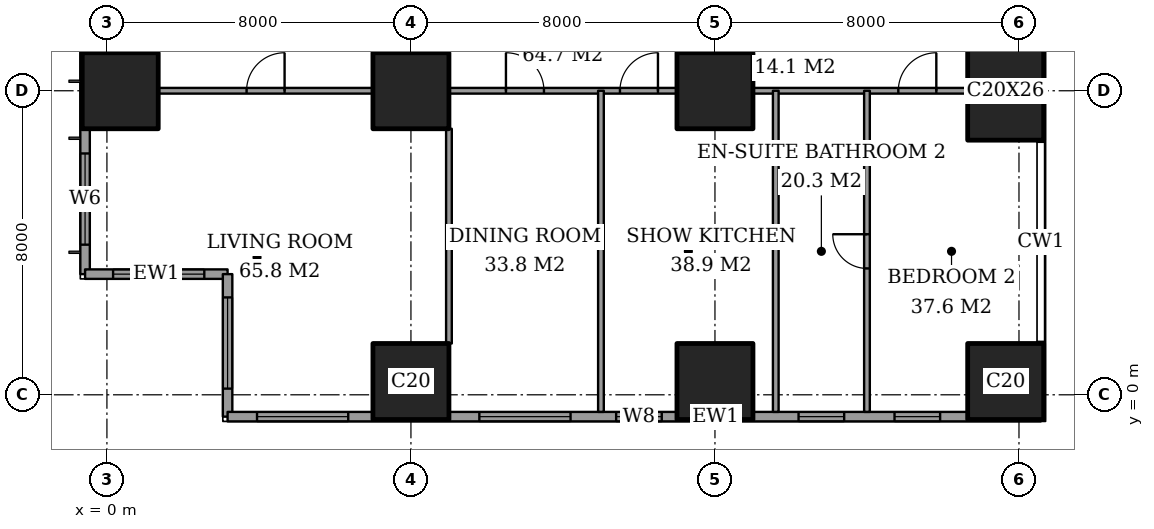
"""IFC4 building model, lengths in metres.
Left out: names, types, materials, properties, quantities, classifications, styles, units other than length and angle.
Written with IfcOpenShell. Run it as: python <this file> out.ifc"""

import sys

from ifc_helpers import new_model, si_unit, direction, frame, frame_2d, origin, origin_2d, place, context, subcontext, project, spatial, rectangle, extrude, element, fill, save


model = new_model("IFC4")
c1 = context("Model", 3, precision=1e-05, world=origin(), true_north=direction((0.0, 1.0)))
c2 = subcontext(c1, "Body", "Model", "MODEL_VIEW")
j1 = project(units=[si_unit("LENGTHUNIT", "METRE"), si_unit("PLANEANGLEUNIT", "RADIAN")], contexts=[c1])
p1 = place(None, origin())
s1 = spatial("IfcSite", under=j1, at=p1, CompositionType="ELEMENT")
p2 = place(p1, origin())
s2 = spatial("IfcBuilding", under=s1, at=p2, CompositionType="ELEMENT")
p3 = place(p2, frame((0.0, 0.0, 51.2)))
s3 = spatial("IfcBuildingStorey", under=s2, at=p3, CompositionType="ELEMENT", Elevation=51.2)
for number, where, z_axis, x_axis in (
    (1, (0.35, 8.0, 0.0), (0.0, 0.0, 1.0), (1.0, 0.0, 0.0)),
    (2, (8.0, 0.35, 0.0), (0.0, 0.0, 1.0), (1.0, 0.0, 0.0)),
    (3, (8.0, 8.0, 0.0), (0.0, 0.0, 1.0), (1.0, 0.0, 0.0)),
    (4, (16.0, 0.35, 0.0), (0.0, 0.0, 1.0), (1.0, 0.0, 0.0)),
    (5, (16.0, 8.0, 0.0), (0.0, 0.0, 1.0), (1.0, 0.0, 0.0)),
    (6, (23.65, 0.35, 0.0), (0.0, 0.0, 1.0), (1.0, 0.0, 0.0)),
):
    element("IfcColumn", number, at=place(p3, frame(where, z_axis=z_axis, x_axis=x_axis)), inside=s3, PredefinedType="COLUMN", context=c2, shape_type="SweptSolid", body=[
        extrude(rectangle(XDim=2.0, YDim=2.0, at=origin_2d()), origin(), (0.0, 0.0, 1.0), 3.6),
    ])
p4 = place(p3, frame((23.65, 8.0, 0.0), z_axis=(0.0, 0.0, 1.0), x_axis=(1.0, 0.0, 0.0)))
e7 = element("IfcColumn", 7, at=p4, inside=s3, PredefinedType="COLUMN", context=c2, shape_type="SweptSolid", body=[
    extrude(rectangle(XDim=2.0, YDim=2.6, at=origin_2d()), origin(), (0.0, 0.0, 1.0), 3.6),
])
p5 = place(p3, frame((-0.575, 44.825, 0.0), z_axis=(0.0, 0.0, 1.0), x_axis=(0.0, -1.0, 0.0)))
e8 = element("IfcWall", 8, at=p5, inside=s3, PredefinedType="SOLIDWALL", context=c2, shape_type="SweptSolid", body=[
    extrude(rectangle(XDim=41.65, YDim=0.25, at=frame_2d((20.825, 0.0))), origin(), (0.0, 0.0, 1.0), 3.6),
])
p6 = place(p5, frame((0.775, 0.0, 0.6)))
e9 = element("IfcOpeningElement", 9, at=p6, cuts=e8, PredefinedType="OPENING", context=c2, shape_type="SweptSolid", body=[
    extrude(rectangle(XDim=2.4, YDim=2.0, at=frame_2d((1.2, 1.0))), frame((0.0, 0.135, 0.0), z_axis=(0.0, -1.0, 0.0), x_axis=(1.0, 0.0, 0.0)), (0.0, 0.0, 1.0), 0.27),
])
p7 = place(p5, frame((6.1, 0.0, 0.6)))
e10 = element("IfcOpeningElement", 10, at=p7, cuts=e8, PredefinedType="OPENING", context=c2, shape_type="SweptSolid", body=[
    extrude(rectangle(XDim=1.2, YDim=2.0, at=frame_2d((0.6, 1.0))), frame((0.0, 0.135, 0.0), z_axis=(0.0, -1.0, 0.0), x_axis=(1.0, 0.0, 0.0)), (0.0, 0.0, 1.0), 0.27),
])
p8 = place(p5, frame((8.425, 0.0, 0.6)))
e11 = element("IfcOpeningElement", 11, at=p8, cuts=e8, PredefinedType="OPENING", context=c2, shape_type="SweptSolid", body=[
    extrude(rectangle(XDim=2.4, YDim=2.0, at=frame_2d((1.2, 1.0))), frame((0.0, 0.135, 0.0), z_axis=(0.0, -1.0, 0.0), x_axis=(1.0, 0.0, 0.0)), (0.0, 0.0, 1.0), 0.27),
])
p9 = place(p5, frame((15.625, 0.0, 0.6)))
e12 = element("IfcOpeningElement", 12, at=p9, cuts=e8, PredefinedType="OPENING", context=c2, shape_type="SweptSolid", body=[
    extrude(rectangle(XDim=2.4, YDim=2.0, at=frame_2d((1.2, 1.0))), frame((0.0, 0.135, 0.0), z_axis=(0.0, -1.0, 0.0), x_axis=(1.0, 0.0, 0.0)), (0.0, 0.0, 1.0), 0.27),
])
p10 = place(p5, frame((23.625, 0.0, 0.6)))
e13 = element("IfcOpeningElement", 13, at=p10, cuts=e8, PredefinedType="OPENING", context=c2, shape_type="SweptSolid", body=[
    extrude(rectangle(XDim=2.4, YDim=2.0, at=frame_2d((1.2, 1.0))), frame((0.0, 0.135, 0.0), z_axis=(0.0, -1.0, 0.0), x_axis=(1.0, 0.0, 0.0)), (0.0, 0.0, 1.0), 0.27),
])
p11 = place(p5, frame((30.825, 0.0, 0.6)))
e14 = element("IfcOpeningElement", 14, at=p11, cuts=e8, PredefinedType="OPENING", context=c2, shape_type="SweptSolid", body=[
    extrude(rectangle(XDim=2.4, YDim=2.0, at=frame_2d((1.2, 1.0))), frame((0.0, 0.135, 0.0), z_axis=(0.0, -1.0, 0.0), x_axis=(1.0, 0.0, 0.0)), (0.0, 0.0, 1.0), 0.27),
])
p12 = place(p5, frame((34.5, 0.0, 0.6)))
e15 = element("IfcOpeningElement", 15, at=p12, cuts=e8, PredefinedType="OPENING", context=c2, shape_type="SweptSolid", body=[
    extrude(rectangle(XDim=1.2, YDim=2.0, at=frame_2d((0.6, 1.0))), frame((0.0, 0.135, 0.0), z_axis=(0.0, -1.0, 0.0), x_axis=(1.0, 0.0, 0.0)), (0.0, 0.0, 1.0), 0.27),
])
p13 = place(p5, frame((38.475, 0.0, 0.6)))
e16 = element("IfcOpeningElement", 16, at=p13, cuts=e8, PredefinedType="OPENING", context=c2, shape_type="SweptSolid", body=[
    extrude(rectangle(XDim=2.4, YDim=2.0, at=frame_2d((1.2, 1.0))), frame((0.0, 0.135, 0.0), z_axis=(0.0, -1.0, 0.0), x_axis=(1.0, 0.0, 0.0)), (0.0, 0.0, 1.0), 0.27),
])
p14 = place(p3, frame((-0.575, 3.175, 0.0), z_axis=(0.0, 0.0, 1.0), x_axis=(1.0, 0.0, 0.0)))
e17 = element("IfcWall", 17, at=p14, inside=s3, PredefinedType="SOLIDWALL", context=c2, shape_type="SweptSolid", body=[
    extrude(rectangle(XDim=3.75, YDim=0.25, at=frame_2d((1.875, 0.0))), origin(), (0.0, 0.0, 1.0), 3.6),
])
p15 = place(p14, frame((0.738, 0.0, 0.6)))
e18 = element("IfcOpeningElement", 18, at=p15, cuts=e17, PredefinedType="OPENING", context=c2, shape_type="SweptSolid", body=[
    extrude(rectangle(XDim=2.4, YDim=2.0, at=frame_2d((1.2, 1.0))), frame((0.0, 0.135, 0.0), z_axis=(0.0, -1.0, 0.0), x_axis=(1.0, 0.0, 0.0)), (0.0, 0.0, 1.0), 0.27),
])
p16 = place(p3, frame((3.175, 3.175, 0.0), z_axis=(0.0, 0.0, 1.0), x_axis=(0.0, -1.0, 0.0)))
e19 = element("IfcWall", 19, at=p16, inside=s3, PredefinedType="SOLIDWALL", context=c2, shape_type="SweptSolid", body=[
    extrude(rectangle(XDim=3.75, YDim=0.25, at=frame_2d((1.875, 0.0))), origin(), (0.0, 0.0, 1.0), 3.6),
])
p17 = place(p16, frame((0.613, 0.0, 0.6)))
e20 = element("IfcOpeningElement", 20, at=p17, cuts=e19, PredefinedType="OPENING", context=c2, shape_type="SweptSolid", body=[
    extrude(rectangle(XDim=2.4, YDim=2.0, at=frame_2d((1.2, 1.0))), frame((0.0, 0.135, 0.0), z_axis=(0.0, -1.0, 0.0), x_axis=(1.0, 0.0, 0.0)), (0.0, 0.0, 1.0), 0.27),
])
p18 = place(p3, frame((3.175, -0.575, 0.0), z_axis=(0.0, 0.0, 1.0), x_axis=(1.0, 0.0, 0.0)))
e21 = element("IfcWall", 21, at=p18, inside=s3, PredefinedType="SOLIDWALL", context=c2, shape_type="SweptSolid", body=[
    extrude(rectangle(XDim=21.4, YDim=0.25, at=frame_2d((10.7, 0.0))), origin(), (0.0, 0.0, 1.0), 3.6),
])
p19 = place(p18, frame((0.775, 0.0, 0.6)))
e22 = element("IfcOpeningElement", 22, at=p19, cuts=e21, PredefinedType="OPENING", context=c2, shape_type="SweptSolid", body=[
    extrude(rectangle(XDim=2.4, YDim=2.0, at=frame_2d((1.2, 1.0))), frame((0.0, 0.135, 0.0), z_axis=(0.0, -1.0, 0.0), x_axis=(1.0, 0.0, 0.0)), (0.0, 0.0, 1.0), 0.27),
])
p20 = place(p18, frame((6.625, 0.0, 0.6)))
e23 = element("IfcOpeningElement", 23, at=p20, cuts=e21, PredefinedType="OPENING", context=c2, shape_type="SweptSolid", body=[
    extrude(rectangle(XDim=2.4, YDim=2.0, at=frame_2d((1.2, 1.0))), frame((0.0, 0.135, 0.0), z_axis=(0.0, -1.0, 0.0), x_axis=(1.0, 0.0, 0.0)), (0.0, 0.0, 1.0), 0.27),
])
p21 = place(p18, frame((10.225, 0.0, 0.6)))
e24 = element("IfcOpeningElement", 24, at=p21, cuts=e21, PredefinedType="OPENING", context=c2, shape_type="SweptSolid", body=[
    extrude(rectangle(XDim=1.2, YDim=2.0, at=frame_2d((0.6, 1.0))), frame((0.0, 0.135, 0.0), z_axis=(0.0, -1.0, 0.0), x_axis=(1.0, 0.0, 0.0)), (0.0, 0.0, 1.0), 0.27),
])
p22 = place(p18, frame((15.025, 0.0, 0.6)))
e25 = element("IfcOpeningElement", 25, at=p22, cuts=e21, PredefinedType="OPENING", context=c2, shape_type="SweptSolid", body=[
    extrude(rectangle(XDim=1.2, YDim=2.0, at=frame_2d((0.6, 1.0))), frame((0.0, 0.135, 0.0), z_axis=(0.0, -1.0, 0.0), x_axis=(1.0, 0.0, 0.0)), (0.0, 0.0, 1.0), 0.27),
])
p23 = place(p18, frame((17.55, 0.0, 0.6)))
e26 = element("IfcOpeningElement", 26, at=p23, cuts=e21, PredefinedType="OPENING", context=c2, shape_type="SweptSolid", body=[
    extrude(rectangle(XDim=1.2, YDim=2.0, at=frame_2d((0.6, 1.0))), frame((0.0, 0.135, 0.0), z_axis=(0.0, -1.0, 0.0), x_axis=(1.0, 0.0, 0.0)), (0.0, 0.0, 1.0), 0.27),
])
p24 = place(p3, frame((1.35, 8.0, 0.0), z_axis=(0.0, 0.0, 1.0), x_axis=(1.0, 0.0, 0.0)))
e27 = element("IfcWall", 27, at=p24, inside=s3, PredefinedType="PARTITIONING", context=c2, shape_type="SweptSolid", body=[
    extrude(rectangle(XDim=5.65, YDim=0.15, at=frame_2d((2.825, 0.0))), origin(), (0.0, 0.0, 1.0), 3.35),
])
p25 = place(p24, frame((2.325, 0.0, 0.0)))
e28 = element("IfcOpeningElement", 28, at=p25, cuts=e27, PredefinedType="OPENING", context=c2, shape_type="SweptSolid", body=[
    extrude(rectangle(XDim=1.0, YDim=2.1, at=frame_2d((0.5, 1.05))), frame((0.0, 0.085, 0.0), z_axis=(0.0, -1.0, 0.0), x_axis=(1.0, 0.0, 0.0)), (0.0, 0.0, 1.0), 0.17),
])
p26 = place(p3, frame((9.0, 8.0, 0.0), z_axis=(0.0, 0.0, 1.0), x_axis=(1.0, 0.0, 0.0)))
e29 = element("IfcWall", 29, at=p26, inside=s3, PredefinedType="PARTITIONING", context=c2, shape_type="SweptSolid", body=[
    extrude(rectangle(XDim=6.0, YDim=0.15, at=frame_2d((3.0, 0.0))), origin(), (0.0, 0.0, 1.0), 3.35),
])
p27 = place(p26, frame((1.5, 0.0, 0.0)))
e30 = element("IfcOpeningElement", 30, at=p27, cuts=e29, PredefinedType="OPENING", context=c2, shape_type="SweptSolid", body=[
    extrude(rectangle(XDim=1.0, YDim=2.1, at=frame_2d((0.5, 1.05))), frame((0.0, 0.085, 0.0), z_axis=(0.0, -1.0, 0.0), x_axis=(1.0, 0.0, 0.0)), (0.0, 0.0, 1.0), 0.17),
])
p28 = place(p26, frame((4.5, 0.0, 0.0)))
e31 = element("IfcOpeningElement", 31, at=p28, cuts=e29, PredefinedType="OPENING", context=c2, shape_type="SweptSolid", body=[
    extrude(rectangle(XDim=1.0, YDim=2.1, at=frame_2d((0.5, 1.05))), frame((0.0, 0.085, 0.0), z_axis=(0.0, -1.0, 0.0), x_axis=(1.0, 0.0, 0.0)), (0.0, 0.0, 1.0), 0.17),
])
p29 = place(p3, frame((17.0, 8.0, 0.0), z_axis=(0.0, 0.0, 1.0), x_axis=(1.0, 0.0, 0.0)))
e32 = element("IfcWall", 32, at=p29, inside=s3, PredefinedType="PARTITIONING", context=c2, shape_type="SweptSolid", body=[
    extrude(rectangle(XDim=5.65, YDim=0.15, at=frame_2d((2.825, 0.0))), origin(), (0.0, 0.0, 1.0), 3.35),
])
p30 = place(p29, frame((3.825, 0.0, 0.0)))
e33 = element("IfcOpeningElement", 33, at=p30, cuts=e32, PredefinedType="OPENING", context=c2, shape_type="SweptSolid", body=[
    extrude(rectangle(XDim=1.0, YDim=2.1, at=frame_2d((0.5, 1.05))), frame((0.0, 0.085, 0.0), z_axis=(0.0, -1.0, 0.0), x_axis=(1.0, 0.0, 0.0)), (0.0, 0.0, 1.0), 0.17),
])
p31 = place(p3, frame((9.0, 1.35, 0.0), z_axis=(0.0, 0.0, 1.0), x_axis=(0.0, 1.0, 0.0)))
e34 = element("IfcWall", 34, at=p31, inside=s3, PredefinedType="PARTITIONING", context=c2, shape_type="SweptSolid", body=[
    extrude(rectangle(XDim=5.65, YDim=0.15, at=frame_2d((2.825, 0.0))), origin(), (0.0, 0.0, 1.0), 3.35),
])
for number, where, z_axis, x_axis in (
    (35, (13.0, -0.45, 0.0), (0.0, 0.0, 1.0), (0.0, 1.0, 0.0)),
    (36, (17.6, -0.45, 0.0), (0.0, 0.0, 1.0), (0.0, 1.0, 0.0)),
):
    element("IfcWall", number, at=place(p3, frame(where, z_axis=z_axis, x_axis=x_axis)), inside=s3, PredefinedType="PARTITIONING", context=c2, shape_type="SweptSolid", body=[
        extrude(rectangle(XDim=8.45, YDim=0.15, at=frame_2d((4.225, 0.0))), origin(), (0.0, 0.0, 1.0), 3.35),
    ])
p32 = place(p3, frame((20.0, -0.45, 0.0), z_axis=(0.0, 0.0, 1.0), x_axis=(0.0, 1.0, 0.0)))
e37 = element("IfcWall", 37, at=p32, inside=s3, PredefinedType="PARTITIONING", context=c2, shape_type="SweptSolid", body=[
    extrude(rectangle(XDim=8.45, YDim=0.15, at=frame_2d((4.225, 0.0))), origin(), (0.0, 0.0, 1.0), 3.35),
])
p33 = place(p32, frame((3.775, 0.0, 0.0)))
e38 = element("IfcOpeningElement", 38, at=p33, cuts=e37, PredefinedType="OPENING", context=c2, shape_type="SweptSolid", body=[
    extrude(rectangle(XDim=0.9, YDim=2.1, at=frame_2d((0.45, 1.05))), frame((0.0, 0.085, 0.0), z_axis=(0.0, -1.0, 0.0), x_axis=(1.0, 0.0, 0.0)), (0.0, 0.0, 1.0), 0.17),
])
p34 = place(p13, origin())
e39 = element("IfcWindow", 39, at=p34, inside=s3, PartitioningType="SINGLE_PANEL", PredefinedType="WINDOW", context=c2, shape_type="SweptSolid", body=[
    extrude(rectangle(XDim=2.4, YDim=2.0, at=frame_2d((1.2, 1.0))), frame((0.0, 0.03, 0.0), z_axis=(0.0, -1.0, 0.0), x_axis=(1.0, 0.0, 0.0)), (0.0, 0.0, 1.0), 0.06),
])
fill(e16, e39)
p35 = place(p15, origin())
e40 = element("IfcWindow", 40, at=p35, inside=s3, PartitioningType="SINGLE_PANEL", PredefinedType="WINDOW", context=c2, shape_type="SweptSolid", body=[
    extrude(rectangle(XDim=2.4, YDim=2.0, at=frame_2d((1.2, 1.0))), frame((0.0, 0.03, 0.0), z_axis=(0.0, -1.0, 0.0), x_axis=(1.0, 0.0, 0.0)), (0.0, 0.0, 1.0), 0.06),
])
fill(e18, e40)
p36 = place(p17, origin())
e41 = element("IfcWindow", 41, at=p36, inside=s3, PartitioningType="SINGLE_PANEL", PredefinedType="WINDOW", context=c2, shape_type="SweptSolid", body=[
    extrude(rectangle(XDim=2.4, YDim=2.0, at=frame_2d((1.2, 1.0))), frame((0.0, 0.03, 0.0), z_axis=(0.0, -1.0, 0.0), x_axis=(1.0, 0.0, 0.0)), (0.0, 0.0, 1.0), 0.06),
])
fill(e20, e41)
p37 = place(p19, origin())
e42 = element("IfcWindow", 42, at=p37, inside=s3, PartitioningType="SINGLE_PANEL", PredefinedType="WINDOW", context=c2, shape_type="SweptSolid", body=[
    extrude(rectangle(XDim=2.4, YDim=2.0, at=frame_2d((1.2, 1.0))), frame((0.0, 0.03, 0.0), z_axis=(0.0, -1.0, 0.0), x_axis=(1.0, 0.0, 0.0)), (0.0, 0.0, 1.0), 0.06),
])
fill(e22, e42)
p38 = place(p20, origin())
e43 = element("IfcWindow", 43, at=p38, inside=s3, PartitioningType="SINGLE_PANEL", PredefinedType="WINDOW", context=c2, shape_type="SweptSolid", body=[
    extrude(rectangle(XDim=2.4, YDim=2.0, at=frame_2d((1.2, 1.0))), frame((0.0, 0.03, 0.0), z_axis=(0.0, -1.0, 0.0), x_axis=(1.0, 0.0, 0.0)), (0.0, 0.0, 1.0), 0.06),
])
fill(e23, e43)
p39 = place(p21, origin())
e44 = element("IfcWindow", 44, at=p39, inside=s3, PartitioningType="SINGLE_PANEL", PredefinedType="WINDOW", context=c2, shape_type="SweptSolid", body=[
    extrude(rectangle(XDim=1.2, YDim=2.0, at=frame_2d((0.6, 1.0))), frame((0.0, 0.03, 0.0), z_axis=(0.0, -1.0, 0.0), x_axis=(1.0, 0.0, 0.0)), (0.0, 0.0, 1.0), 0.06),
])
fill(e24, e44)
p40 = place(p22, origin())
e45 = element("IfcWindow", 45, at=p40, inside=s3, PartitioningType="SINGLE_PANEL", PredefinedType="WINDOW", context=c2, shape_type="SweptSolid", body=[
    extrude(rectangle(XDim=1.2, YDim=2.0, at=frame_2d((0.6, 1.0))), frame((0.0, 0.03, 0.0), z_axis=(0.0, -1.0, 0.0), x_axis=(1.0, 0.0, 0.0)), (0.0, 0.0, 1.0), 0.06),
])
fill(e25, e45)
p41 = place(p23, origin())
e46 = element("IfcWindow", 46, at=p41, inside=s3, PartitioningType="SINGLE_PANEL", PredefinedType="WINDOW", context=c2, shape_type="SweptSolid", body=[
    extrude(rectangle(XDim=1.2, YDim=2.0, at=frame_2d((0.6, 1.0))), frame((0.0, 0.03, 0.0), z_axis=(0.0, -1.0, 0.0), x_axis=(1.0, 0.0, 0.0)), (0.0, 0.0, 1.0), 0.06),
])
fill(e26, e46)
p42 = place(p25, origin())
e47 = element("IfcDoor", 47, at=p42, inside=s3, OperationType="SINGLE_SWING_LEFT", PredefinedType="DOOR", context=c2, shape_type="SweptSolid", body=[
    extrude(rectangle(XDim=1.0, YDim=2.1, at=frame_2d((0.5, 1.05))), frame((0.0, 0.025, 0.0), z_axis=(0.0, -1.0, 0.0), x_axis=(1.0, 0.0, 0.0)), (0.0, 0.0, 1.0), 0.05),
])
fill(e28, e47)
p43 = place(p27, origin())
e48 = element("IfcDoor", 48, at=p43, inside=s3, OperationType="SINGLE_SWING_RIGHT", PredefinedType="DOOR", context=c2, shape_type="SweptSolid", body=[
    extrude(rectangle(XDim=1.0, YDim=2.1, at=frame_2d((0.5, 1.05))), frame((0.0, 0.025, 0.0), z_axis=(0.0, -1.0, 0.0), x_axis=(1.0, 0.0, 0.0)), (0.0, 0.0, 1.0), 0.05),
])
fill(e30, e48)
p44 = place(p28, origin())
e49 = element("IfcDoor", 49, at=p44, inside=s3, OperationType="SINGLE_SWING_LEFT", PredefinedType="DOOR", context=c2, shape_type="SweptSolid", body=[
    extrude(rectangle(XDim=1.0, YDim=2.1, at=frame_2d((0.5, 1.05))), frame((0.0, 0.025, 0.0), z_axis=(0.0, -1.0, 0.0), x_axis=(1.0, 0.0, 0.0)), (0.0, 0.0, 1.0), 0.05),
])
fill(e31, e49)
p45 = place(p33, origin())
e50 = element("IfcDoor", 50, at=p45, inside=s3, OperationType="SINGLE_SWING_LEFT", PredefinedType="DOOR", context=c2, shape_type="SweptSolid", body=[
    extrude(rectangle(XDim=0.9, YDim=2.1, at=frame_2d((0.45, 1.05))), frame((0.0, 0.025, 0.0), z_axis=(0.0, -1.0, 0.0), x_axis=(1.0, 0.0, 0.0)), (0.0, 0.0, 1.0), 0.05),
])
fill(e38, e50)
p46 = place(p30, origin())
e51 = element("IfcDoor", 51, at=p46, inside=s3, OperationType="SINGLE_SWING_LEFT", PredefinedType="DOOR", context=c2, shape_type="SweptSolid", body=[
    extrude(rectangle(XDim=1.0, YDim=2.1, at=frame_2d((0.5, 1.05))), frame((0.0, 0.025, 0.0), z_axis=(0.0, -1.0, 0.0), x_axis=(1.0, 0.0, 0.0)), (0.0, 0.0, 1.0), 0.05),
])
fill(e33, e51)
save(model, sys.argv[1])
